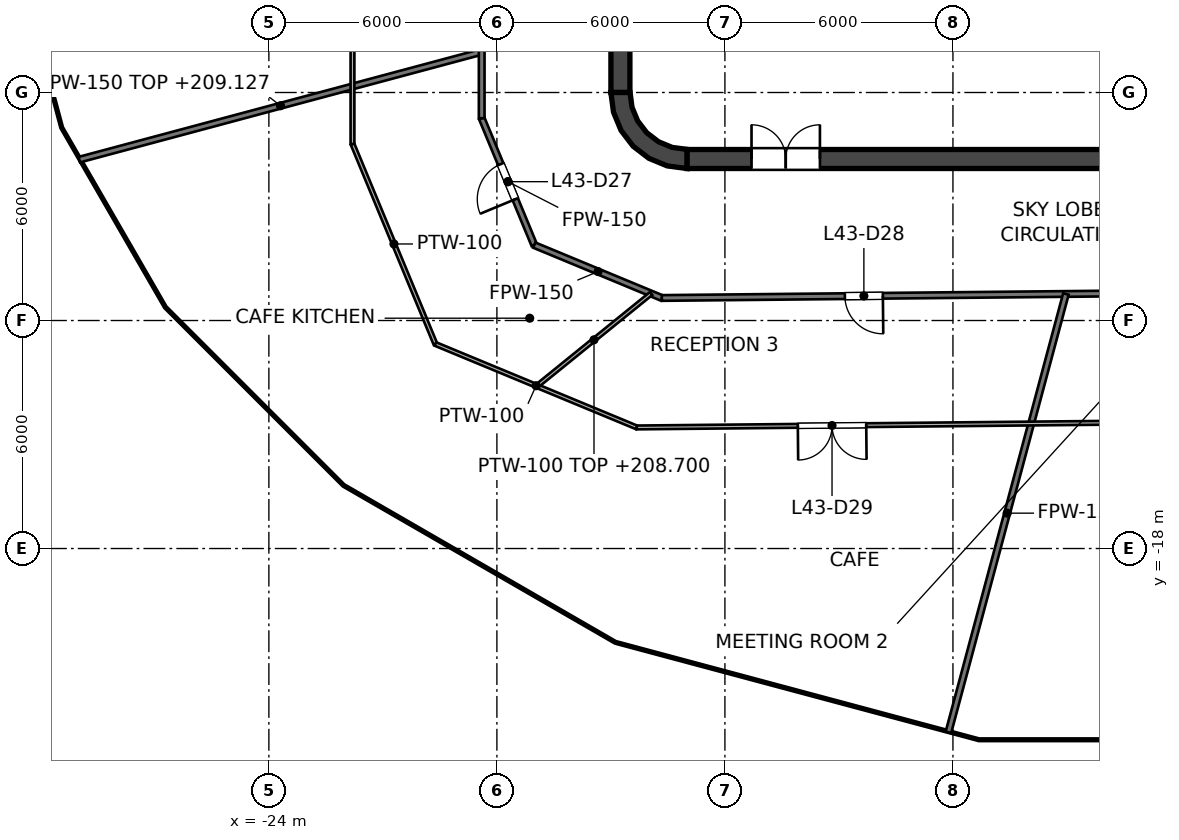
"""IFC4 building model, lengths in metres.
Left out: names, types, materials, properties, quantities, classifications, styles, units other than length and angle.
Written with IfcOpenShell. Run it as: python <this file> out.ifc"""

import sys

from ifc_helpers import new_model, si_unit, direction, frame, frame_2d, origin, place, context, subcontext, project, spatial, polyline, rectangle, outline, extrude, element, fill, save


model = new_model("IFC4")
c1 = context("Model", 3, precision=1e-05, world=origin(), true_north=direction((0.0, 1.0)))
c2 = subcontext(c1, "Body", "Model", "MODEL_VIEW")
j1 = project(units=[si_unit("LENGTHUNIT", "METRE"), si_unit("PLANEANGLEUNIT", "RADIAN")], contexts=[c1])
p1 = place(None, origin())
s1 = spatial("IfcSite", under=j1, at=p1, CompositionType="ELEMENT")
p2 = place(p1, origin())
s2 = spatial("IfcBuilding", under=s1, at=p2, CompositionType="ELEMENT")
p3 = place(p2, frame((0.0, 0.0, 203.0)))
s3 = spatial("IfcBuildingStorey", under=s2, at=p3, CompositionType="ELEMENT", Elevation=203.0)
p4 = place(p3, frame((-13.0, -7.75, 0.0), z_axis=(0.0, 0.0, 1.0), x_axis=(1.0, 0.0, 0.0)))
e1 = element("IfcWall", 1, at=p4, inside=s3, PredefinedType="SHEAR", context=c2, shape_type="SweptSolid", body=[
    extrude(rectangle(XDim=26.0, YDim=0.5, at=frame_2d((13.0, 0.0))), origin(), (0.0, 0.0, 1.0), 6.45),
])
p5 = place(p4, frame((1.7, 0.0, 0.0)))
e2 = element("IfcOpeningElement", 2, at=p5, cuts=e1, PredefinedType="OPENING", context=c2, shape_type="SweptSolid", body=[
    extrude(rectangle(XDim=1.8, YDim=2.1, at=frame_2d((0.9, 1.05))), frame((0.0, 0.25, 0.0), z_axis=(0.0, -1.0, 0.0), x_axis=(1.0, 0.0, 0.0)), (0.0, 0.0, 1.0), 0.5),
])
p6 = place(p4, frame((22.5, 0.0, 0.0)))
e3 = element("IfcOpeningElement", 3, at=p6, cuts=e1, PredefinedType="OPENING", context=c2, shape_type="SweptSolid", body=[
    extrude(rectangle(XDim=1.8, YDim=2.1, at=frame_2d((0.9, 1.05))), frame((0.0, 0.25, 0.0), z_axis=(0.0, -1.0, 0.0), x_axis=(1.0, 0.0, 0.0)), (0.0, 0.0, 1.0), 0.5),
])
p7 = place(p3, frame((-14.75, -6.0, 0.0), z_axis=(0.0, 0.0, 1.0), x_axis=(0.0, 1.0, 0.0)))
e4 = element("IfcWall", 4, at=p7, inside=s3, PredefinedType="SHEAR", context=c2, shape_type="SweptSolid", body=[
    extrude(rectangle(XDim=12.0, YDim=0.5, at=frame_2d((6.0, 0.0))), origin(), (0.0, 0.0, 1.0), 6.45),
])
p8 = place(p3, origin())
e5 = element("IfcWall", 5, at=p8, inside=s3, PredefinedType="SHEAR", context=c2, shape_type="SweptSolid", body=[
    extrude(outline(polyline([(-13.0, -8.0), (-13.0, -7.496), (-13.387, -7.445), (-13.748, -7.295), (-14.058, -7.058), (-14.295, -6.748), (-14.445, -6.387), (-14.496, -6.0), (-15.0, -6.0), (-14.932, -6.518), (-14.732, -7.0), (-14.414, -7.414), (-14.0, -7.732), (-13.518, -7.932), (-13.0, -8.0)])), origin(), (0.0, 0.0, 1.0), 6.45),
])
p9 = place(p3, frame((-9.0, -6.6, 0.0), z_axis=(0.0, 0.0, 1.0), x_axis=(0.0, 1.0, 0.0)))
e6 = element("IfcWall", 6, at=p9, inside=s3, PredefinedType="PARTITIONING", context=c2, shape_type="SweptSolid", body=[
    extrude(rectangle(XDim=2.5, YDim=0.25, at=frame_2d((1.25, 0.0))), origin(), (0.0, 0.0, 1.0), 5.7),
])
p10 = place(p9, frame((0.75, 0.0, 0.0)))
e7 = element("IfcOpeningElement", 7, at=p10, cuts=e6, PredefinedType="OPENING", context=c2, shape_type="SweptSolid", body=[
    extrude(rectangle(XDim=1.0, YDim=2.1, at=frame_2d((0.5, 1.05))), frame((0.0, 0.125, 0.0), z_axis=(0.0, -1.0, 0.0), x_axis=(1.0, 0.0, 0.0)), (0.0, 0.0, 1.0), 0.25),
])
p11 = place(p3, frame((-2.9, -6.6, 0.0), z_axis=(0.0, 0.0, 1.0), x_axis=(0.0, 1.0, 0.0)))
e8 = element("IfcWall", 8, at=p11, inside=s3, PredefinedType="PARTITIONING", context=c2, shape_type="SweptSolid", body=[
    extrude(rectangle(XDim=2.5, YDim=0.25, at=frame_2d((1.25, 0.0))), origin(), (0.0, 0.0, 1.0), 5.7),
])
p12 = place(p11, frame((0.8, 0.0, 0.0)))
e9 = element("IfcOpeningElement", 9, at=p12, cuts=e8, PredefinedType="OPENING", context=c2, shape_type="SweptSolid", body=[
    extrude(rectangle(XDim=0.9, YDim=2.1, at=frame_2d((0.45, 1.05))), frame((0.0, 0.125, 0.0), z_axis=(0.0, -1.0, 0.0), x_axis=(1.0, 0.0, 0.0)), (0.0, 0.0, 1.0), 0.25),
])
p13 = place(p3, frame((-9.125, -7.05, 0.0), z_axis=(0.0, 0.0, 1.0), x_axis=(1.0, 0.0, 0.0)))
e10 = element("IfcWall", 10, at=p13, inside=s3, PredefinedType="SOLIDWALL", context=c2, shape_type="SweptSolid", body=[
    extrude(rectangle(XDim=18.25, YDim=0.9, at=frame_2d((9.125, 0.0))), origin(), (0.0, 0.0, 1.0), 5.7),
])
p14 = place(p3, frame((-11.8, -7.5, 0.0), z_axis=(0.0, 0.0, 1.0), x_axis=(0.0, 1.0, 0.0)))
e11 = element("IfcWall", 11, at=p14, inside=s3, PredefinedType="SOLIDWALL", context=c2, shape_type="SweptSolid", body=[
    extrude(rectangle(XDim=15.0, YDim=0.4, at=frame_2d((7.5, 0.0))), origin(), (0.0, 0.0, 1.0), 5.7),
])
p15 = place(p14, frame((11.3, 0.0, 0.0)))
e12 = element("IfcOpeningElement", 12, at=p15, cuts=e11, PredefinedType="OPENING", context=c2, shape_type="SweptSolid", body=[
    extrude(rectangle(XDim=1.1, YDim=2.1, at=frame_2d((0.55, 1.05))), frame((0.0, 0.2, 0.0), z_axis=(0.0, -1.0, 0.0), x_axis=(1.0, 0.0, 0.0)), (0.0, 0.0, 1.0), 0.4),
])
p16 = place(p14, frame((8.4, 0.0, 0.0)))
e13 = element("IfcOpeningElement", 13, at=p16, cuts=e11, PredefinedType="OPENING", context=c2, shape_type="SweptSolid", body=[
    extrude(rectangle(XDim=1.1, YDim=2.1, at=frame_2d((0.55, 1.05))), frame((0.0, 0.2, 0.0), z_axis=(0.0, -1.0, 0.0), x_axis=(1.0, 0.0, 0.0)), (0.0, 0.0, 1.0), 0.4),
])
p17 = place(p14, frame((5.5, 0.0, 0.0)))
e14 = element("IfcOpeningElement", 14, at=p17, cuts=e11, PredefinedType="OPENING", context=c2, shape_type="SweptSolid", body=[
    extrude(rectangle(XDim=1.1, YDim=2.1, at=frame_2d((0.55, 1.05))), frame((0.0, 0.2, 0.0), z_axis=(0.0, -1.0, 0.0), x_axis=(1.0, 0.0, 0.0)), (0.0, 0.0, 1.0), 0.4),
])
p18 = place(p14, frame((2.6, 0.0, 0.0)))
e15 = element("IfcOpeningElement", 15, at=p18, cuts=e11, PredefinedType="OPENING", context=c2, shape_type="SweptSolid", body=[
    extrude(rectangle(XDim=1.1, YDim=2.1, at=frame_2d((0.55, 1.05))), frame((0.0, 0.2, 0.0), z_axis=(0.0, -1.0, 0.0), x_axis=(1.0, 0.0, 0.0)), (0.0, 0.0, 1.0), 0.4),
])
p19 = place(p14, frame((13.697, 0.0, 0.0)))
e16 = element("IfcOpeningElement", 16, at=p19, cuts=e11, PredefinedType="OPENING", context=c2, shape_type="SweptSolid", body=[
    extrude(rectangle(XDim=0.9, YDim=2.1, at=frame_2d((0.45, 1.05))), frame((0.0, 0.2, 0.0), z_axis=(0.0, -1.0, 0.0), x_axis=(1.0, 0.0, 0.0)), (0.0, 0.0, 1.0), 0.4),
])
p20 = place(p14, frame((0.403, 0.0, 0.0)))
e17 = element("IfcOpeningElement", 17, at=p20, cuts=e11, PredefinedType="OPENING", context=c2, shape_type="SweptSolid", body=[
    extrude(rectangle(XDim=0.9, YDim=2.1, at=frame_2d((0.45, 1.05))), frame((0.0, 0.2, 0.0), z_axis=(0.0, -1.0, 0.0), x_axis=(1.0, 0.0, 0.0)), (0.0, 0.0, 1.0), 0.4),
])
e18 = element("IfcWall", 18, at=p8, inside=s3, PredefinedType="SOLIDWALL", context=c2, shape_type="SweptSolid", body=[
    extrude(outline(polyline([(-12.0, -5.925), (-12.0, -5.675), (-14.25, -5.675), (-14.25, -3.025), (-12.0, -3.025), (-12.0, -2.775), (-14.25, -2.775), (-14.25, -0.125), (-12.0, -0.125), (-12.0, 0.125), (-14.25, 0.125), (-14.25, 2.775), (-12.0, 2.775), (-12.0, 3.025), (-14.25, 3.025), (-14.25, 5.675), (-12.0, 5.675), (-12.0, 5.925), (-14.25, 5.925), (-14.5, 5.925), (-14.5, 5.675), (-14.5, 3.025), (-14.5, 2.775), (-14.5, 0.125), (-14.5, -0.125), (-14.5, -2.775), (-14.5, -3.025), (-14.5, -5.675), (-14.5, -5.925), (-14.25, -5.925), (-12.0, -5.925)])), origin(), (0.0, 0.0, 1.0), 5.7),
])
p21 = place(p3, frame((-18.4, -6.677, 0.0), z_axis=(0.0, 0.0, 1.0), x_axis=(0.382844919445, -0.923812625837, 0.0)))
e19 = element("IfcWall", 19, at=p21, inside=s3, PredefinedType="PARTITIONING", context=c2, shape_type="SweptSolid", body=[
    extrude(rectangle(XDim=3.615, YDim=0.15, at=frame_2d((1.807, 0.0))), origin(), (0.0, 0.0, 1.0), 5.527),
])
p22 = place(p21, frame((1.307, 0.0, 0.0)))
e20 = element("IfcOpeningElement", 20, at=p22, cuts=e19, PredefinedType="OPENING", context=c2, shape_type="SweptSolid", body=[
    extrude(rectangle(XDim=1.0, YDim=2.1, at=frame_2d((0.5, 1.05))), frame((0.0, 0.075, 0.0), z_axis=(0.0, -1.0, 0.0), x_axis=(1.0, 0.0, 0.0)), (0.0, 0.0, 1.0), 0.15),
])
p23 = place(p3, frame((-17.016, -10.016, 0.0), z_axis=(0.0, 0.0, 1.0), x_axis=(0.923755451027, -0.382982854314, 0.0)))
e21 = element("IfcWall", 21, at=p23, inside=s3, PredefinedType="PARTITIONING", context=c2, shape_type="SweptSolid", body=[
    extrude(rectangle(XDim=3.633, YDim=0.15, at=frame_2d((1.816, 0.0))), origin(), (0.0, 0.0, 1.0), 5.527),
])
p24 = place(p3, frame((-13.66, -11.407, 0.0), z_axis=(0.0, 0.0, 1.0), x_axis=(0.999950890236, 0.009910454857, 0.0)))
e22 = element("IfcWall", 22, at=p24, inside=s3, PredefinedType="PARTITIONING", context=c2, shape_type="SweptSolid", body=[
    extrude(rectangle(XDim=29.635, YDim=0.15, at=frame_2d((14.818, 0.0))), origin(), (0.0, 0.0, 1.0), 5.527),
])
p25 = place(p24, frame((4.817, 0.0, 0.0)))
e23 = element("IfcOpeningElement", 23, at=p25, cuts=e22, PredefinedType="OPENING", context=c2, shape_type="SweptSolid", body=[
    extrude(rectangle(XDim=1.0, YDim=2.1, at=frame_2d((0.5, 1.05))), frame((0.0, 0.075, 0.0), z_axis=(0.0, -1.0, 0.0), x_axis=(1.0, 0.0, 0.0)), (0.0, 0.0, 1.0), 0.15),
])
p26 = place(p24, frame((14.217, 0.0, 0.0)))
e24 = element("IfcOpeningElement", 24, at=p26, cuts=e22, PredefinedType="OPENING", context=c2, shape_type="SweptSolid", body=[
    extrude(rectangle(XDim=1.0, YDim=2.1, at=frame_2d((0.5, 1.05))), frame((0.0, 0.075, 0.0), z_axis=(0.0, -1.0, 0.0), x_axis=(1.0, 0.0, 0.0)), (0.0, 0.0, 1.0), 0.15),
])
p27 = place(p24, frame((19.582, 0.0, 0.0)))
e25 = element("IfcOpeningElement", 25, at=p27, cuts=e22, PredefinedType="OPENING", context=c2, shape_type="SweptSolid", body=[
    extrude(rectangle(XDim=1.0, YDim=2.1, at=frame_2d((0.5, 1.05))), frame((0.0, 0.075, 0.0), z_axis=(0.0, -1.0, 0.0), x_axis=(1.0, 0.0, 0.0)), (0.0, 0.0, 1.0), 0.15),
])
p28 = place(p3, frame((-28.988, -7.767, 0.0), z_axis=(0.0, 0.0, 1.0), x_axis=(0.96592965996, 0.258804737225, 0.0)))
e26 = element("IfcWall", 26, at=p28, inside=s3, PredefinedType="PARTITIONING", context=c2, shape_type="SweptSolid", body=[
    extrude(rectangle(XDim=10.962, YDim=0.15, at=frame_2d((5.481, 0.0))), origin(), (0.0, 0.0, 1.0), 6.127),
])
p29 = place(p3, frame((-6.119, -22.837, 0.0), z_axis=(0.0, 0.0, 1.0), x_axis=(0.258861094582, 0.965914558184, 0.0)))
e27 = element("IfcWall", 27, at=p29, inside=s3, PredefinedType="PARTITIONING", context=c2, shape_type="SweptSolid", body=[
    extrude(rectangle(XDim=11.942, YDim=0.15, at=frame_2d((5.971, 0.0))), origin(), (0.0, 0.0, 1.0), 5.902),
])
p30 = place(p3, frame((-18.4, -6.677, 0.0), z_axis=(0.0, 0.0, 1.0), x_axis=(0.0, 1.0, 0.0)))
e28 = element("IfcWall", 28, at=p30, inside=s3, PredefinedType="PARTITIONING", context=c2, shape_type="SweptSolid", body=[
    extrude(rectangle(XDim=13.588, YDim=0.15, at=frame_2d((6.794, 0.0))), origin(), (0.0, 0.0, 1.0), 5.518),
])
p31 = place(p30, frame((7.167, 0.0, 0.0)))
e29 = element("IfcOpeningElement", 29, at=p31, cuts=e28, PredefinedType="OPENING", context=c2, shape_type="SweptSolid", body=[
    extrude(rectangle(XDim=1.0, YDim=2.1, at=frame_2d((0.5, 1.05))), frame((0.0, 0.075, 0.0), z_axis=(0.0, -1.0, 0.0), x_axis=(1.0, 0.0, 0.0)), (0.0, 0.0, 1.0), 0.15),
])
p32 = place(p3, frame((-21.8, -7.354, 0.0), z_axis=(0.0, 0.0, 1.0), x_axis=(0.382944578189, -0.923771319124, 0.0)))
e30 = element("IfcWall", 30, at=p32, inside=s3, PredefinedType="PARTITIONING", context=c2, shape_type="SweptSolid", body=[
    extrude(rectangle(XDim=5.698, YDim=0.1, at=frame_2d((2.849, 0.0))), origin(), (0.0, 0.0, 1.0), 5.527),
])
p33 = place(p3, frame((-19.618, -12.618, 0.0), z_axis=(0.0, 0.0, 1.0), x_axis=(0.923780681685, -0.382921992247, 0.0)))
e31 = element("IfcWall", 31, at=p33, inside=s3, PredefinedType="PARTITIONING", context=c2, shape_type="SweptSolid", body=[
    extrude(rectangle(XDim=5.735, YDim=0.1, at=frame_2d((2.867, 0.0))), origin(), (0.0, 0.0, 1.0), 5.527),
])
p34 = place(p3, frame((-14.32, -14.814, 0.0), z_axis=(0.0, 0.0, 1.0), x_axis=(0.999950809916, 0.009918555737, 0.0)))
e32 = element("IfcWall", 32, at=p34, inside=s3, PredefinedType="PARTITIONING", context=c2, shape_type="SweptSolid", body=[
    extrude(rectangle(XDim=32.27, YDim=0.1, at=frame_2d((16.135, 0.0))), origin(), (0.0, 0.0, 1.0), 5.527),
])
p35 = place(p34, frame((4.239, 0.0, 0.0)))
e33 = element("IfcOpeningElement", 33, at=p35, cuts=e32, PredefinedType="OPENING", context=c2, shape_type="SweptSolid", body=[
    extrude(rectangle(XDim=1.8, YDim=2.1, at=frame_2d((0.9, 1.05))), frame((0.0, 0.05, 0.0), z_axis=(0.0, -1.0, 0.0), x_axis=(1.0, 0.0, 0.0)), (0.0, 0.0, 1.0), 0.1),
])
p36 = place(p34, frame((21.845, 0.0, 0.0)))
e34 = element("IfcOpeningElement", 34, at=p36, cuts=e32, PredefinedType="OPENING", context=c2, shape_type="SweptSolid", body=[
    extrude(rectangle(XDim=1.8, YDim=2.1, at=frame_2d((0.9, 1.05))), frame((0.0, 0.05, 0.0), z_axis=(0.0, -1.0, 0.0), x_axis=(1.0, 0.0, 0.0)), (0.0, 0.0, 1.0), 0.1),
])
p37 = place(p3, frame((-16.948, -13.725, 0.0), z_axis=(0.0, 0.0, 1.0), x_axis=(0.777049371159, 0.629439651421, 0.0)))
e35 = element("IfcWall", 35, at=p37, inside=s3, PredefinedType="PARTITIONING", context=c2, shape_type="SweptSolid", body=[
    extrude(rectangle(XDim=3.869, YDim=0.1, at=frame_2d((1.934, 0.0))), origin(), (0.0, 0.0, 1.0), 5.7),
])
p38 = place(p3, frame((-21.8, -7.354, 0.0), z_axis=(0.0, 0.0, 1.0), x_axis=(0.0, 1.0, 0.0)))
e36 = element("IfcWall", 36, at=p38, inside=s3, PredefinedType="PARTITIONING", context=c2, shape_type="SweptSolid", body=[
    extrude(rectangle(XDim=15.176, YDim=0.1, at=frame_2d((7.588, 0.0))), origin(), (0.0, 0.0, 1.0), 5.518),
])
p39 = place(p38, frame((7.445, 0.0, 0.0)))
e37 = element("IfcOpeningElement", 37, at=p39, cuts=e36, PredefinedType="OPENING", context=c2, shape_type="SweptSolid", body=[
    extrude(rectangle(XDim=1.8, YDim=2.1, at=frame_2d((0.9, 1.05))), frame((0.0, 0.05, 0.0), z_axis=(0.0, -1.0, 0.0), x_axis=(1.0, 0.0, 0.0)), (0.0, 0.0, 1.0), 0.1),
])
p40 = place(p10, origin())
e38 = element("IfcDoor", 38, at=p40, inside=s3, OperationType="SINGLE_SWING_LEFT", PredefinedType="DOOR", context=c2, shape_type="SweptSolid", body=[
    extrude(rectangle(XDim=1.0, YDim=2.1, at=frame_2d((0.5, 1.05))), frame((0.0, 0.025, 0.0), z_axis=(0.0, -1.0, 0.0), x_axis=(1.0, 0.0, 0.0)), (0.0, 0.0, 1.0), 0.05),
])
fill(e7, e38)
p41 = place(p12, origin())
e39 = element("IfcDoor", 39, at=p41, inside=s3, OperationType="SINGLE_SWING_RIGHT", PredefinedType="DOOR", context=c2, shape_type="SweptSolid", body=[
    extrude(rectangle(XDim=0.9, YDim=2.1, at=frame_2d((0.45, 1.05))), frame((0.0, 0.025, 0.0), z_axis=(0.0, -1.0, 0.0), x_axis=(1.0, 0.0, 0.0)), (0.0, 0.0, 1.0), 0.05),
])
fill(e9, e39)
p42 = place(p20, origin())
e40 = element("IfcDoor", 40, at=p42, inside=s3, OperationType="SINGLE_SWING_LEFT", PredefinedType="DOOR", context=c2, shape_type="SweptSolid", body=[
    extrude(rectangle(XDim=0.9, YDim=2.1, at=frame_2d((0.45, 1.05))), frame((0.0, 0.025, 0.0), z_axis=(0.0, -1.0, 0.0), x_axis=(1.0, 0.0, 0.0)), (0.0, 0.0, 1.0), 0.05),
])
fill(e17, e40)
p43 = place(p5, origin())
e41 = element("IfcDoor", 41, at=p43, inside=s3, OperationType="DOUBLE_DOOR_SINGLE_SWING", PredefinedType="DOOR", context=c2, shape_type="SweptSolid", body=[
    extrude(rectangle(XDim=1.8, YDim=2.1, at=frame_2d((0.9, 1.05))), frame((0.0, 0.025, 0.0), z_axis=(0.0, -1.0, 0.0), x_axis=(1.0, 0.0, 0.0)), (0.0, 0.0, 1.0), 0.05),
])
fill(e2, e41)
p44 = place(p22, origin())
e42 = element("IfcDoor", 42, at=p44, inside=s3, OperationType="SINGLE_SWING_RIGHT", PredefinedType="DOOR", context=c2, shape_type="SweptSolid", body=[
    extrude(rectangle(XDim=1.0, YDim=2.1, at=frame_2d((0.5, 1.05))), frame((0.0, 0.025, 0.0), z_axis=(0.0, -1.0, 0.0), x_axis=(1.0, 0.0, 0.0)), (0.0, 0.0, 1.0), 0.05),
])
fill(e20, e42)
p45 = place(p25, origin())
e43 = element("IfcDoor", 43, at=p45, inside=s3, OperationType="SINGLE_SWING_RIGHT", PredefinedType="DOOR", context=c2, shape_type="SweptSolid", body=[
    extrude(rectangle(XDim=1.0, YDim=2.1, at=frame_2d((0.5, 1.05))), frame((0.0, 0.025, 0.0), z_axis=(0.0, -1.0, 0.0), x_axis=(1.0, 0.0, 0.0)), (0.0, 0.0, 1.0), 0.05),
])
fill(e23, e43)
p46 = place(p35, origin())
e44 = element("IfcDoor", 44, at=p46, inside=s3, OperationType="DOUBLE_DOOR_SINGLE_SWING", PredefinedType="DOOR", context=c2, shape_type="SweptSolid", body=[
    extrude(rectangle(XDim=1.8, YDim=2.1, at=frame_2d((0.9, 1.05))), frame((0.0, 0.025, 0.0), z_axis=(0.0, -1.0, 0.0), x_axis=(1.0, 0.0, 0.0)), (0.0, 0.0, 1.0), 0.05),
])
fill(e33, e44)
save(model, sys.argv[1])
